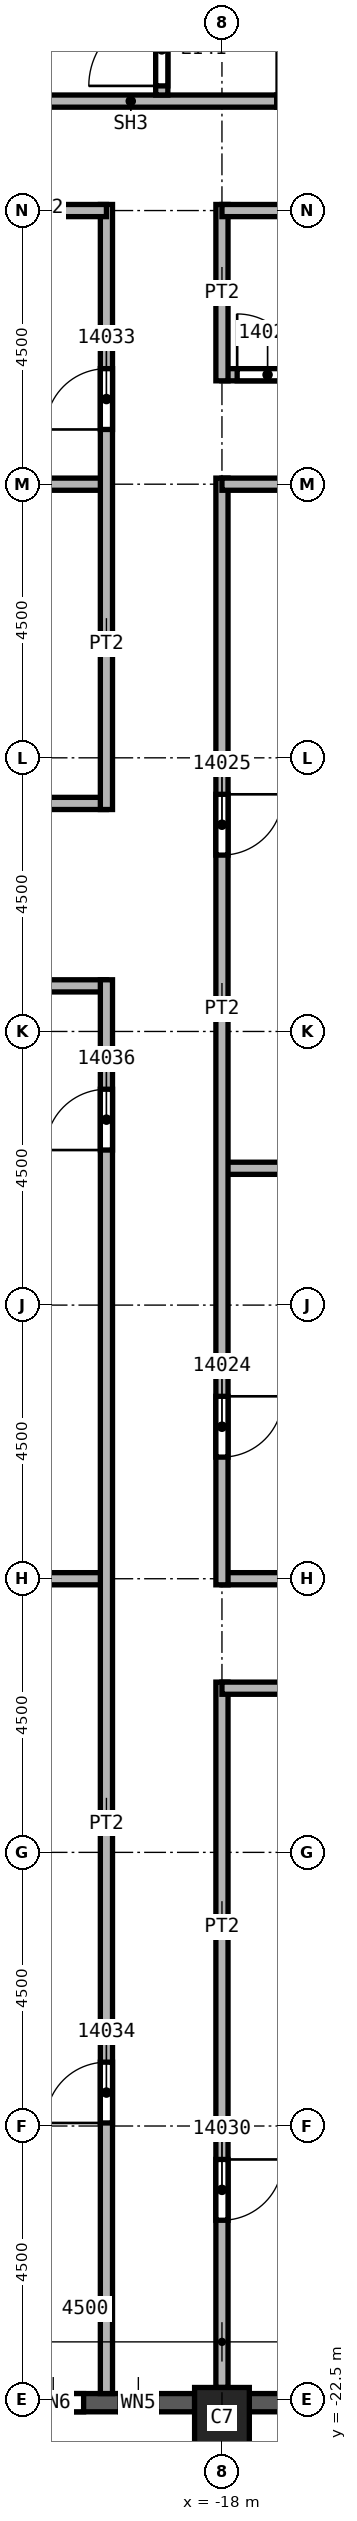
"""IFC4 building model, lengths in metres.
Left out: names, types, materials, properties, quantities, classifications, styles, units other than length and angle.
Written with IfcOpenShell. Run it as: python <this file> out.ifc"""

import sys

from ifc_helpers import new_model, si_unit, direction, frame, frame_2d, origin, origin_2d, place, context, subcontext, project, spatial, rectangle, extrude, element, fill, save


model = new_model("IFC4")
c1 = context("Model", 3, precision=1e-05, world=origin(), true_north=direction((0.0, 1.0)))
c2 = subcontext(c1, "Body", "Model", "MODEL_VIEW")
j1 = project(units=[si_unit("LENGTHUNIT", "METRE"), si_unit("PLANEANGLEUNIT", "RADIAN")], contexts=[c1])
p1 = place(None, origin())
s1 = spatial("IfcSite", under=j1, at=p1, CompositionType="ELEMENT")
p2 = place(p1, origin())
s2 = spatial("IfcBuilding", under=s1, at=p2, CompositionType="ELEMENT")
p3 = place(p2, frame((0.0, 0.0, 220.0)))
s3 = spatial("IfcBuildingStorey", under=s2, at=p3, CompositionType="ELEMENT", Elevation=220.0)
p4 = place(p3, frame((-18.0, -22.8, 0.0), z_axis=(0.0, 0.0, 1.0), x_axis=(1.0, 0.0, 0.0)))
e1 = element("IfcColumn", 1, at=p4, inside=s3, PredefinedType="COLUMN", context=c2, shape_type="SweptSolid", body=[
    extrude(rectangle(XDim=0.9, YDim=1.0, at=origin_2d()), origin(), (0.0, 0.0, 1.0), 3.72),
])
p5 = place(p3, frame((-22.05, -22.55, 0.0), z_axis=(0.0, 0.0, 1.0), x_axis=(1.0, 0.0, 0.0)))
e2 = element("IfcWall", 2, at=p5, inside=s3, PredefinedType="SOLIDWALL", context=c2, shape_type="SweptSolid", body=[
    extrude(rectangle(XDim=3.6, YDim=0.3, at=frame_2d((1.8, 0.0))), origin(), (0.0, 0.0, 1.0), 3.12),
])
p6 = place(p5, frame((0.775, 0.0, 0.8)))
e3 = element("IfcOpeningElement", 3, at=p6, cuts=e2, PredefinedType="OPENING", context=c2, shape_type="SweptSolid", body=[
    extrude(rectangle(XDim=1.0, YDim=1.95, at=frame_2d((0.5, 0.975))), frame((0.0, 0.15, 0.0), z_axis=(0.0, -1.0, 0.0), x_axis=(1.0, 0.0, 0.0)), (0.0, 0.0, 1.0), 0.3),
])
p7 = place(p5, frame((2.375, 0.0, 0.8)))
e4 = element("IfcOpeningElement", 4, at=p7, cuts=e2, PredefinedType="OPENING", context=c2, shape_type="SweptSolid", body=[
    extrude(rectangle(XDim=0.6, YDim=1.95, at=frame_2d((0.3, 0.975))), frame((0.0, 0.15, 0.0), z_axis=(0.0, -1.0, 0.0), x_axis=(1.0, 0.0, 0.0)), (0.0, 0.0, 1.0), 0.3),
])
p8 = place(p3, frame((-17.55, -22.55, 0.0), z_axis=(0.0, 0.0, 1.0), x_axis=(1.0, 0.0, 0.0)))
e5 = element("IfcWall", 5, at=p8, inside=s3, PredefinedType="SOLIDWALL", context=c2, shape_type="SweptSolid", body=[
    extrude(rectangle(XDim=3.6, YDim=0.3, at=frame_2d((1.8, 0.0))), origin(), (0.0, 0.0, 1.0), 3.12),
])
p9 = place(p8, frame((0.6, 0.0, 0.8)))
e6 = element("IfcOpeningElement", 6, at=p9, cuts=e5, PredefinedType="OPENING", context=c2, shape_type="SweptSolid", body=[
    extrude(rectangle(XDim=2.4, YDim=1.95, at=frame_2d((1.2, 0.975))), frame((0.0, 0.15, 0.0), z_axis=(0.0, -1.0, 0.0), x_axis=(1.0, 0.0, 0.0)), (0.0, 0.0, 1.0), 0.3),
])
p10 = place(p3, frame((-33.85, 3.75, 0.0), z_axis=(0.0, 0.0, 1.0), x_axis=(1.0, 0.0, 0.0)))
e7 = element("IfcWall", 7, at=p10, inside=s3, PredefinedType="PARTITIONING", context=c2, shape_type="SweptSolid", body=[
    extrude(rectangle(XDim=13.95, YDim=0.2, at=frame_2d((6.975, 0.0))), origin(), (0.0, 0.0, 1.0), 3.72),
])
p11 = place(p10, frame((9.85, 0.0, 0.0)))
e8 = element("IfcOpeningElement", 8, at=p11, cuts=e7, PredefinedType="OPENING", context=c2, shape_type="SweptSolid", body=[
    extrude(rectangle(XDim=1.0, YDim=2.1, at=frame_2d((0.5, 1.05))), frame((0.0, 0.1, 0.0), z_axis=(0.0, -1.0, 0.0), x_axis=(1.0, 0.0, 0.0)), (0.0, 0.0, 1.0), 0.2),
])
p12 = place(p3, frame((-19.9, 0.75, 0.0), z_axis=(0.0, 0.0, 1.0), x_axis=(-1.0, 0.0, 0.0)))
e9 = element("IfcWall", 9, at=p12, inside=s3, PredefinedType="PARTITIONING", context=c2, shape_type="SweptSolid", body=[
    extrude(rectangle(XDim=13.95, YDim=0.2, at=frame_2d((6.975, 0.0))), origin(), (0.0, 0.0, 1.0), 3.72),
])
p13 = place(p12, frame((8.15, 0.0, 0.0)))
e10 = element("IfcOpeningElement", 10, at=p13, cuts=e9, PredefinedType="OPENING", context=c2, shape_type="SweptSolid", body=[
    extrude(rectangle(XDim=1.0, YDim=2.1, at=frame_2d((0.5, 1.05))), frame((0.0, 0.1, 0.0), z_axis=(0.0, -1.0, 0.0), x_axis=(1.0, 0.0, 0.0)), (0.0, 0.0, 1.0), 0.2),
])
for number, where, z_axis, x_axis in (
    (11, (-27.1, -9.0, 0.0), (0.0, 0.0, 1.0), (1.0, 0.0, 0.0)),
    (12, (-27.1, 9.0, 0.0), (0.0, 0.0, 1.0), (1.0, 0.0, 0.0)),
):
    element("IfcWall", number, at=place(p3, frame(where, z_axis=z_axis, x_axis=x_axis)), inside=s3, PredefinedType="PARTITIONING", context=c2, shape_type="SweptSolid", body=[
        extrude(rectangle(XDim=7.2, YDim=0.2, at=frame_2d((3.6, 0.0))), origin(), (0.0, 0.0, 1.0), 3.72),
    ])
p14 = place(p3, frame((-19.9, -22.4, 0.0), z_axis=(0.0, 0.0, 1.0), x_axis=(0.0, 1.0, 0.0)))
e13 = element("IfcWall", 13, at=p14, inside=s3, PredefinedType="PARTITIONING", context=c2, shape_type="SweptSolid", body=[
    extrude(rectangle(XDim=23.25, YDim=0.2, at=frame_2d((11.625, 0.0))), origin(), (0.0, 0.0, 1.0), 3.72),
])
p15 = place(p14, frame((4.45, 0.0, 0.0)))
e14 = element("IfcOpeningElement", 14, at=p15, cuts=e13, PredefinedType="OPENING", context=c2, shape_type="SweptSolid", body=[
    extrude(rectangle(XDim=1.0, YDim=2.1, at=frame_2d((0.5, 1.05))), frame((0.0, 0.1, 0.0), z_axis=(0.0, -1.0, 0.0), x_axis=(1.0, 0.0, 0.0)), (0.0, 0.0, 1.0), 0.2),
])
p16 = place(p14, frame((20.45, 0.0, 0.0)))
e15 = element("IfcOpeningElement", 15, at=p16, cuts=e13, PredefinedType="OPENING", context=c2, shape_type="SweptSolid", body=[
    extrude(rectangle(XDim=1.0, YDim=2.1, at=frame_2d((0.5, 1.05))), frame((0.0, 0.1, 0.0), z_axis=(0.0, -1.0, 0.0), x_axis=(1.0, 0.0, 0.0)), (0.0, 0.0, 1.0), 0.2),
])
p17 = place(p3, frame((-19.9, 3.65, 0.0), z_axis=(0.0, 0.0, 1.0), x_axis=(0.0, 1.0, 0.0)))
e16 = element("IfcWall", 16, at=p17, inside=s3, PredefinedType="PARTITIONING", context=c2, shape_type="SweptSolid", body=[
    extrude(rectangle(XDim=9.95, YDim=0.2, at=frame_2d((4.975, 0.0))), origin(), (0.0, 0.0, 1.0), 3.72),
])
p18 = place(p17, frame((6.25, 0.0, 0.0)))
e17 = element("IfcOpeningElement", 17, at=p18, cuts=e16, PredefinedType="OPENING", context=c2, shape_type="SweptSolid", body=[
    extrude(rectangle(XDim=1.0, YDim=2.1, at=frame_2d((0.5, 1.05))), frame((0.0, 0.1, 0.0), z_axis=(0.0, -1.0, 0.0), x_axis=(1.0, 0.0, 0.0)), (0.0, 0.0, 1.0), 0.2),
])
p19 = place(p3, frame((-19.9, 13.5, 0.0), z_axis=(0.0, 0.0, 1.0), x_axis=(-1.0, 0.0, 0.0)))
e18 = element("IfcWall", 18, at=p19, inside=s3, PredefinedType="PARTITIONING", context=c2, shape_type="SweptSolid", body=[
    extrude(rectangle(XDim=2.1, YDim=0.2, at=frame_2d((1.05, 0.0))), origin(), (0.0, 0.0, 1.0), 3.72),
])
p20 = place(p3, frame((-18.0, -10.7, 0.0), z_axis=(0.0, 0.0, 1.0), x_axis=(0.0, -1.0, 0.0)))
e19 = element("IfcWall", 19, at=p20, inside=s3, PredefinedType="PARTITIONING", context=c2, shape_type="SweptSolid", body=[
    extrude(rectangle(XDim=11.6, YDim=0.2, at=frame_2d((5.8, 0.0))), origin(), (0.0, 0.0, 1.0), 3.72),
])
p21 = place(p20, frame((7.85, 0.0, 0.0)))
e20 = element("IfcOpeningElement", 20, at=p21, cuts=e19, PredefinedType="OPENING", context=c2, shape_type="SweptSolid", body=[
    extrude(rectangle(XDim=1.0, YDim=2.1, at=frame_2d((0.5, 1.05))), frame((0.0, 0.1, 0.0), z_axis=(0.0, -1.0, 0.0), x_axis=(1.0, 0.0, 0.0)), (0.0, 0.0, 1.0), 0.2),
])
for number, where, z_axis, x_axis in (
    (21, (-18.0, -9.0, 0.0), (0.0, 0.0, 1.0), (1.0, 0.0, 0.0)),
    (22, (-18.0, -2.25, 0.0), (0.0, 0.0, 1.0), (1.0, 0.0, 0.0)),
):
    element("IfcWall", number, at=place(p3, frame(where, z_axis=z_axis, x_axis=x_axis)), inside=s3, PredefinedType="PARTITIONING", context=c2, shape_type="SweptSolid", body=[
        extrude(rectangle(XDim=4.5, YDim=0.2, at=frame_2d((2.25, 0.0))), origin(), (0.0, 0.0, 1.0), 3.72),
    ])
p22 = place(p3, frame((-18.0, 9.1, 0.0), z_axis=(0.0, 0.0, 1.0), x_axis=(0.0, -1.0, 0.0)))
e23 = element("IfcWall", 23, at=p22, inside=s3, PredefinedType="PARTITIONING", context=c2, shape_type="SweptSolid", body=[
    extrude(rectangle(XDim=18.2, YDim=0.2, at=frame_2d((9.1, 0.0))), origin(), (0.0, 0.0, 1.0), 3.72),
])
p23 = place(p22, frame((15.1, 0.0, 0.0)))
e24 = element("IfcOpeningElement", 24, at=p23, cuts=e23, PredefinedType="OPENING", context=c2, shape_type="SweptSolid", body=[
    extrude(rectangle(XDim=1.0, YDim=2.1, at=frame_2d((0.5, 1.05))), frame((0.0, 0.1, 0.0), z_axis=(0.0, -1.0, 0.0), x_axis=(1.0, 0.0, 0.0)), (0.0, 0.0, 1.0), 0.2),
])
p24 = place(p22, frame((5.2, 0.0, 0.0)))
e25 = element("IfcOpeningElement", 25, at=p24, cuts=e23, PredefinedType="OPENING", context=c2, shape_type="SweptSolid", body=[
    extrude(rectangle(XDim=1.0, YDim=2.1, at=frame_2d((0.5, 1.05))), frame((0.0, 0.1, 0.0), z_axis=(0.0, -1.0, 0.0), x_axis=(1.0, 0.0, 0.0)), (0.0, 0.0, 1.0), 0.2),
])
p25 = place(p3, frame((-18.0, 10.8, 0.0), z_axis=(0.0, 0.0, 1.0), x_axis=(1.0, 0.0, 0.0)))
e26 = element("IfcWall", 26, at=p25, inside=s3, PredefinedType="PARTITIONING", context=c2, shape_type="SweptSolid", body=[
    extrude(rectangle(XDim=3.6, YDim=0.2, at=frame_2d((1.8, 0.0))), origin(), (0.0, 0.0, 1.0), 3.72),
])
p26 = place(p25, frame((0.25, 0.0, 0.0)))
e27 = element("IfcOpeningElement", 27, at=p26, cuts=e26, PredefinedType="OPENING", context=c2, shape_type="SweptSolid", body=[
    extrude(rectangle(XDim=1.0, YDim=2.1, at=frame_2d((0.5, 1.05))), frame((0.0, 0.1, 0.0), z_axis=(0.0, -1.0, 0.0), x_axis=(1.0, 0.0, 0.0)), (0.0, 0.0, 1.0), 0.2),
])
p27 = place(p3, frame((-18.0, 13.6, 0.0), z_axis=(0.0, 0.0, 1.0), x_axis=(0.0, -1.0, 0.0)))
e28 = element("IfcWall", 28, at=p27, inside=s3, PredefinedType="PARTITIONING", context=c2, shape_type="SweptSolid", body=[
    extrude(rectangle(XDim=2.9, YDim=0.2, at=frame_2d((1.45, 0.0))), origin(), (0.0, 0.0, 1.0), 3.72),
])
p28 = place(p3, frame((-15.3, 13.5, 0.0), z_axis=(0.0, 0.0, 1.0), x_axis=(-1.0, 0.0, 0.0)))
e29 = element("IfcWall", 29, at=p28, inside=s3, PredefinedType="PARTITIONING", context=c2, shape_type="SweptSolid", body=[
    extrude(rectangle(XDim=2.7, YDim=0.2, at=frame_2d((1.35, 0.0))), origin(), (0.0, 0.0, 1.0), 3.72),
])
p29 = place(p3, frame((-14.4, -10.8, 0.0), z_axis=(0.0, 0.0, 1.0), x_axis=(-1.0, 0.0, 0.0)))
e30 = element("IfcWall", 30, at=p29, inside=s3, PredefinedType="PARTITIONING", context=c2, shape_type="SweptSolid", body=[
    extrude(rectangle(XDim=3.6, YDim=0.2, at=frame_2d((1.8, 0.0))), origin(), (0.0, 0.0, 1.0), 3.72),
])
p30 = place(p3, frame((-13.5, 9.0, 0.0), z_axis=(0.0, 0.0, 1.0), x_axis=(-1.0, 0.0, 0.0)))
e31 = element("IfcWall", 31, at=p30, inside=s3, PredefinedType="PARTITIONING", context=c2, shape_type="SweptSolid", body=[
    extrude(rectangle(XDim=4.5, YDim=0.2, at=frame_2d((2.25, 0.0))), origin(), (0.0, 0.0, 1.0), 3.72),
])
p31 = place(p3, frame((-21.9, 15.3, 0.0), z_axis=(0.0, 0.0, 1.0), x_axis=(1.0, 0.0, 0.0)))
e32 = element("IfcWall", 32, at=p31, inside=s3, PredefinedType="SOLIDWALL", context=c2, shape_type="SweptSolid", body=[
    extrude(rectangle(XDim=8.275, YDim=0.2, at=frame_2d((4.137, 0.0))), origin(), (0.0, 0.0, 1.0), 3.72),
])
p32 = place(p31, frame((4.8, 0.0, 0.0)))
e33 = element("IfcOpeningElement", 33, at=p32, cuts=e32, PredefinedType="OPENING", context=c2, shape_type="SweptSolid", body=[
    extrude(rectangle(XDim=1.2, YDim=2.1, at=frame_2d((0.6, 1.05))), frame((0.0, 0.1, 0.0), z_axis=(0.0, -1.0, 0.0), x_axis=(1.0, 0.0, 0.0)), (0.0, 0.0, 1.0), 0.2),
])
p33 = place(p3, frame((-18.99, 15.4, 0.0), z_axis=(0.0, 0.0, 1.0), x_axis=(0.0, 1.0, 0.0)))
e34 = element("IfcWall", 34, at=p33, inside=s3, PredefinedType="SOLIDWALL", context=c2, shape_type="SweptSolid", body=[
    extrude(rectangle(XDim=5.9, YDim=0.2, at=frame_2d((2.95, 0.0))), origin(), (0.0, 0.0, 1.0), 3.72),
])
p34 = place(p33, frame((0.15, 0.0, 0.0)))
e35 = element("IfcOpeningElement", 35, at=p34, cuts=e34, PredefinedType="OPENING", context=c2, shape_type="SweptSolid", body=[
    extrude(rectangle(XDim=1.2, YDim=2.1, at=frame_2d((0.6, 1.05))), frame((0.0, 0.1, 0.0), z_axis=(0.0, -1.0, 0.0), x_axis=(1.0, 0.0, 0.0)), (0.0, 0.0, 1.0), 0.2),
])
p35 = place(p23, origin())
e36 = element("IfcDoor", 36, at=p35, inside=s3, OperationType="SINGLE_SWING_LEFT", PredefinedType="DOOR", context=c2, shape_type="SweptSolid", body=[
    extrude(rectangle(XDim=1.0, YDim=2.1, at=frame_2d((0.5, 1.05))), frame((0.0, 0.025, 0.0), z_axis=(0.0, -1.0, 0.0), x_axis=(1.0, 0.0, 0.0)), (0.0, 0.0, 1.0), 0.05),
])
fill(e24, e36)
p36 = place(p24, origin())
e37 = element("IfcDoor", 37, at=p36, inside=s3, OperationType="SINGLE_SWING_RIGHT", PredefinedType="DOOR", context=c2, shape_type="SweptSolid", body=[
    extrude(rectangle(XDim=1.0, YDim=2.1, at=frame_2d((0.5, 1.05))), frame((0.0, 0.025, 0.0), z_axis=(0.0, -1.0, 0.0), x_axis=(1.0, 0.0, 0.0)), (0.0, 0.0, 1.0), 0.05),
])
fill(e25, e37)
p37 = place(p26, origin())
e38 = element("IfcDoor", 38, at=p37, inside=s3, OperationType="SINGLE_SWING_LEFT", PredefinedType="DOOR", context=c2, shape_type="SweptSolid", body=[
    extrude(rectangle(XDim=1.0, YDim=2.1, at=frame_2d((0.5, 1.05))), frame((0.0, 0.025, 0.0), z_axis=(0.0, -1.0, 0.0), x_axis=(1.0, 0.0, 0.0)), (0.0, 0.0, 1.0), 0.05),
])
fill(e27, e38)
p38 = place(p21, origin())
e39 = element("IfcDoor", 39, at=p38, inside=s3, OperationType="SINGLE_SWING_LEFT", PredefinedType="DOOR", context=c2, shape_type="SweptSolid", body=[
    extrude(rectangle(XDim=1.0, YDim=2.1, at=frame_2d((0.5, 1.05))), frame((0.0, 0.025, 0.0), z_axis=(0.0, -1.0, 0.0), x_axis=(1.0, 0.0, 0.0)), (0.0, 0.0, 1.0), 0.05),
])
fill(e20, e39)
p39 = place(p18, origin())
e40 = element("IfcDoor", 40, at=p39, inside=s3, OperationType="SINGLE_SWING_RIGHT", PredefinedType="DOOR", context=c2, shape_type="SweptSolid", body=[
    extrude(rectangle(XDim=1.0, YDim=2.1, at=frame_2d((0.5, 1.05))), frame((0.0, 0.025, 0.0), z_axis=(0.0, -1.0, 0.0), x_axis=(1.0, 0.0, 0.0)), (0.0, 0.0, 1.0), 0.05),
])
fill(e17, e40)
p40 = place(p15, origin())
e41 = element("IfcDoor", 41, at=p40, inside=s3, OperationType="SINGLE_SWING_LEFT", PredefinedType="DOOR", context=c2, shape_type="SweptSolid", body=[
    extrude(rectangle(XDim=1.0, YDim=2.1, at=frame_2d((0.5, 1.05))), frame((0.0, 0.025, 0.0), z_axis=(0.0, -1.0, 0.0), x_axis=(1.0, 0.0, 0.0)), (0.0, 0.0, 1.0), 0.05),
])
fill(e14, e41)
p41 = place(p16, origin())
e42 = element("IfcDoor", 42, at=p41, inside=s3, OperationType="SINGLE_SWING_LEFT", PredefinedType="DOOR", context=c2, shape_type="SweptSolid", body=[
    extrude(rectangle(XDim=1.0, YDim=2.1, at=frame_2d((0.5, 1.05))), frame((0.0, 0.025, 0.0), z_axis=(0.0, -1.0, 0.0), x_axis=(1.0, 0.0, 0.0)), (0.0, 0.0, 1.0), 0.05),
])
fill(e15, e42)
p42 = place(p34, origin())
e43 = element("IfcDoor", 43, at=p42, inside=s3, OperationType="SINGLE_SWING_LEFT", PredefinedType="DOOR", context=c2, shape_type="SweptSolid", body=[
    extrude(rectangle(XDim=1.2, YDim=2.1, at=frame_2d((0.6, 1.05))), frame((0.0, 0.025, 0.0), z_axis=(0.0, -1.0, 0.0), x_axis=(1.0, 0.0, 0.0)), (0.0, 0.0, 1.0), 0.05),
])
fill(e35, e43)
p43 = place(p6, origin())
e44 = element("IfcWindow", 44, at=p43, inside=s3, PartitioningType="SINGLE_PANEL", PredefinedType="WINDOW", context=c2, shape_type="SweptSolid", body=[
    extrude(rectangle(XDim=1.0, YDim=1.95, at=frame_2d((0.5, 0.975))), frame((0.0, 0.03, 0.0), z_axis=(0.0, -1.0, 0.0), x_axis=(1.0, 0.0, 0.0)), (0.0, 0.0, 1.0), 0.06),
])
fill(e3, e44)
p44 = place(p7, origin())
e45 = element("IfcWindow", 45, at=p44, inside=s3, PartitioningType="SINGLE_PANEL", PredefinedType="WINDOW", context=c2, shape_type="SweptSolid", body=[
    extrude(rectangle(XDim=0.6, YDim=1.95, at=frame_2d((0.3, 0.975))), frame((0.0, 0.03, 0.0), z_axis=(0.0, -1.0, 0.0), x_axis=(1.0, 0.0, 0.0)), (0.0, 0.0, 1.0), 0.06),
])
fill(e4, e45)
save(model, sys.argv[1])
